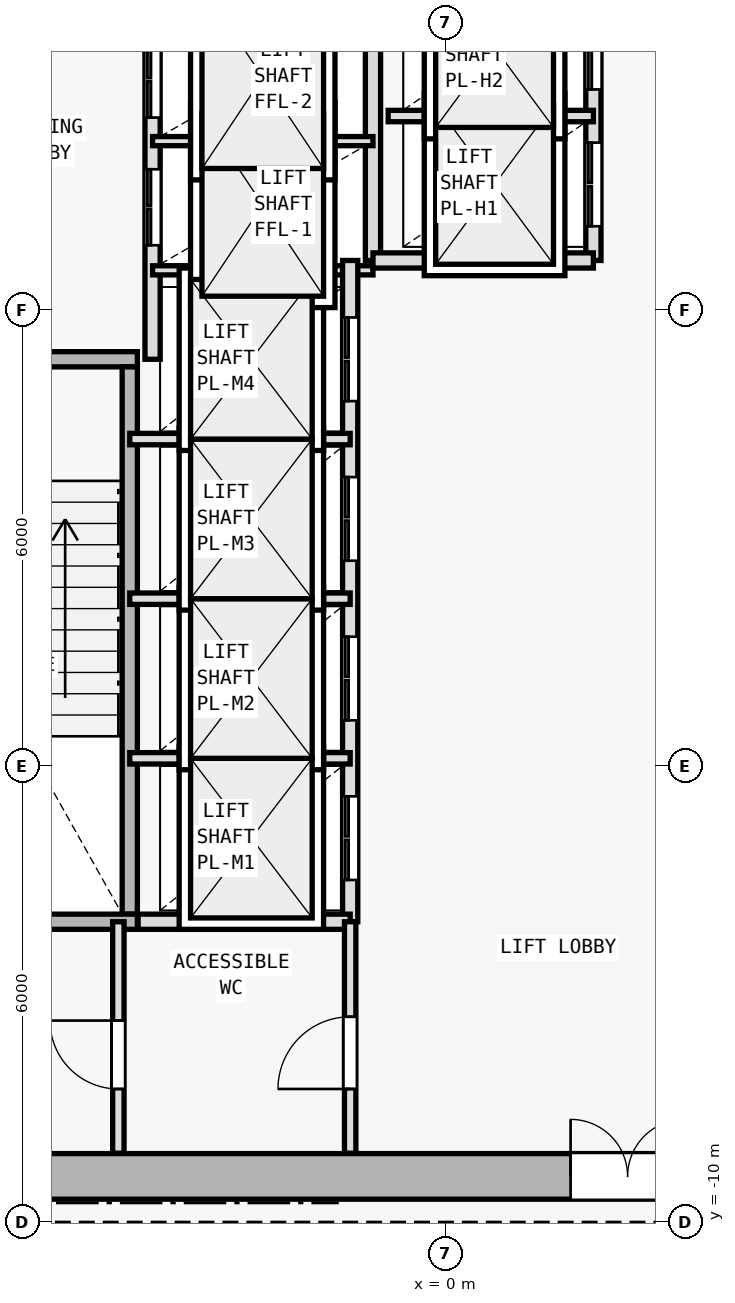
"""IFC4 building model, lengths in metres.
Left out: names, types, materials, properties, quantities, classifications, styles, units other than length and angle.
Written with IfcOpenShell. Run it as: python <this file> out.ifc"""

import sys

from ifc_helpers import new_model, si_unit, direction, frame, frame_2d, origin, origin_2d, place, context, subcontext, project, spatial, rectangle, i_section, extrude, element, fill, save


model = new_model("IFC4")
c1 = context("Model", 3, precision=1e-05, world=origin(), true_north=direction((0.0, 1.0)))
c2 = subcontext(c1, "Body", "Model", "MODEL_VIEW")
j1 = project(units=[si_unit("LENGTHUNIT", "METRE"), si_unit("PLANEANGLEUNIT", "RADIAN")], contexts=[c1])
p1 = place(None, origin())
s1 = spatial("IfcSite", under=j1, at=p1, CompositionType="ELEMENT")
p2 = place(p1, origin())
s2 = spatial("IfcBuilding", under=s1, at=p2, CompositionType="ELEMENT")
p3 = place(p2, frame((0.0, 0.0, 78.0)))
s3 = spatial("IfcBuildingStorey", under=s2, at=p3, CompositionType="ELEMENT", Elevation=78.0)
p4 = place(p3, frame((0.0, -9.4, 0.0), z_axis=(0.0, 0.0, 1.0), x_axis=(1.0, 0.0, 0.0)))
e1 = element("IfcColumn", 1, at=p4, inside=s3, PredefinedType="COLUMN", context=c2, shape_type="SweptSolid", body=[
    extrude(i_section(OverallWidth=0.416, OverallDepth=0.446, WebThickness=0.025, FlangeThickness=0.04, FilletRadius=0.015, at=origin_2d()), origin(), (0.0, 0.0, 1.0), 4.5),
])
p5 = place(p3, frame((-8.0, -9.4, 0.0), z_axis=(0.0, 0.0, 1.0), x_axis=(1.0, 0.0, 0.0)))
e2 = element("IfcWall", 2, at=p5, inside=s3, PredefinedType="SHEAR", context=c2, shape_type="SweptSolid", body=[
    extrude(rectangle(XDim=16.0, YDim=0.6, at=frame_2d((8.0, 0.0))), origin(), (0.0, 0.0, 1.0), 4.25),
])
p6 = place(p5, frame((9.65, 0.0, 0.0)))
e3 = element("IfcOpeningElement", 3, at=p6, cuts=e2, PredefinedType="OPENING", context=c2, shape_type="SweptSolid", body=[
    extrude(rectangle(XDim=1.5, YDim=2.2, at=frame_2d((0.75, 1.1))), frame((0.0, 0.31, 0.0), z_axis=(0.0, -1.0, 0.0), x_axis=(1.0, 0.0, 0.0)), (0.0, 0.0, 1.0), 0.62),
])
p7 = place(p3, frame((-7.4, 1.35, 0.0), z_axis=(0.0, 0.0, 1.0), x_axis=(1.0, 0.0, 0.0)))
e4 = element("IfcWall", 4, at=p7, inside=s3, PredefinedType="SOLIDWALL", context=c2, shape_type="SweptSolid", body=[
    extrude(rectangle(XDim=3.35, YDim=0.2, at=frame_2d((1.675, 0.0))), origin(), (0.0, 0.0, 1.0), 4.25),
])
p8 = place(p7, frame((0.65, 0.0, 0.0)))
e5 = element("IfcOpeningElement", 5, at=p8, cuts=e4, PredefinedType="OPENING", context=c2, shape_type="SweptSolid", body=[
    extrude(rectangle(XDim=1.0, YDim=2.15, at=frame_2d((0.5, 1.075))), frame((0.0, 0.11, 0.0), z_axis=(0.0, -1.0, 0.0), x_axis=(1.0, 0.0, 0.0)), (0.0, 0.0, 1.0), 0.22),
])
p9 = place(p3, frame((-4.15, -5.95, 0.0), z_axis=(0.0, 0.0, 1.0), x_axis=(0.0, 1.0, 0.0)))
e6 = element("IfcWall", 6, at=p9, inside=s3, PredefinedType="SOLIDWALL", context=c2, shape_type="SweptSolid", body=[
    extrude(rectangle(XDim=7.2, YDim=0.2, at=frame_2d((3.6, 0.0))), origin(), (0.0, 0.0, 1.0), 4.25),
])
p10 = place(p3, frame((-3.85, 1.35, 0.0), z_axis=(0.0, 0.0, 1.0), x_axis=(0.0, 1.0, 0.0)))
e7 = element("IfcWall", 7, at=p10, inside=s3, PredefinedType="SOLIDWALL", context=c2, shape_type="SweptSolid", body=[
    extrude(rectangle(XDim=8.545, YDim=0.2, at=frame_2d((4.272, 0.0))), origin(), (0.0, 0.0, 1.0), 4.25),
])
p11 = place(p10, frame((1.5, 0.0, 0.0)))
e8 = element("IfcOpeningElement", 8, at=p11, cuts=e7, PredefinedType="OPENING", context=c2, shape_type="SweptSolid", body=[
    extrude(rectangle(XDim=1.0, YDim=2.15, at=frame_2d((0.5, 1.075))), frame((0.0, 0.11, 0.0), z_axis=(0.0, -1.0, 0.0), x_axis=(1.0, 0.0, 0.0)), (0.0, 0.0, 1.0), 0.22),
])
p12 = place(p10, frame((3.18, 0.0, 0.0)))
e9 = element("IfcOpeningElement", 9, at=p12, cuts=e7, PredefinedType="OPENING", context=c2, shape_type="SweptSolid", body=[
    extrude(rectangle(XDim=1.0, YDim=2.15, at=frame_2d((0.5, 1.075))), frame((0.0, 0.11, 0.0), z_axis=(0.0, -1.0, 0.0), x_axis=(1.0, 0.0, 0.0)), (0.0, 0.0, 1.0), 0.22),
])
p13 = place(p3, frame((-0.95, 2.65, 0.0), z_axis=(0.0, 0.0, 1.0), x_axis=(0.0, 1.0, 0.0)))
e10 = element("IfcWall", 10, at=p13, inside=s3, PredefinedType="SOLIDWALL", context=c2, shape_type="SweptSolid", body=[
    extrude(rectangle(XDim=3.27, YDim=0.2, at=frame_2d((1.635, 0.0))), origin(), (0.0, 0.0, 1.0), 4.25),
])
for number, where, z_axis, x_axis in (
    (11, (-3.85, 2.52, 0.0), (0.0, 0.0, 1.0), (1.0, 0.0, 0.0)),
    (12, (-3.85, 4.22, 0.0), (0.0, 0.0, 1.0), (1.0, 0.0, 0.0)),
):
    element("IfcWall", number, at=place(p3, frame(where, z_axis=z_axis, x_axis=x_axis)), inside=s3, PredefinedType="PARTITIONING", context=c2, shape_type="SweptSolid", body=[
        extrude(rectangle(XDim=2.9, YDim=0.12, at=frame_2d((1.45, 0.0))), origin(), (0.0, 0.0, 1.0), 4.25),
    ])
p14 = place(p3, frame((-1.25, -6.05, 0.0), z_axis=(0.0, 0.0, 1.0), x_axis=(0.0, 1.0, 0.0)))
e13 = element("IfcWall", 13, at=p14, inside=s3, PredefinedType="SOLIDWALL", context=c2, shape_type="SweptSolid", body=[
    extrude(rectangle(XDim=8.7, YDim=0.2, at=frame_2d((4.35, 0.0))), origin(), (0.0, 0.0, 1.0), 4.25),
])
p15 = place(p14, frame((0.55, 0.0, 0.0)))
e14 = element("IfcOpeningElement", 14, at=p15, cuts=e13, PredefinedType="OPENING", context=c2, shape_type="SweptSolid", body=[
    extrude(rectangle(XDim=1.1, YDim=2.15, at=frame_2d((0.55, 1.075))), frame((0.0, 0.11, 0.0), z_axis=(0.0, -1.0, 0.0), x_axis=(1.0, 0.0, 0.0)), (0.0, 0.0, 1.0), 0.22),
])
p16 = place(p14, frame((2.65, 0.0, 0.0)))
e15 = element("IfcOpeningElement", 15, at=p16, cuts=e13, PredefinedType="OPENING", context=c2, shape_type="SweptSolid", body=[
    extrude(rectangle(XDim=1.1, YDim=2.15, at=frame_2d((0.55, 1.075))), frame((0.0, 0.11, 0.0), z_axis=(0.0, -1.0, 0.0), x_axis=(1.0, 0.0, 0.0)), (0.0, 0.0, 1.0), 0.22),
])
p17 = place(p14, frame((4.75, 0.0, 0.0)))
e16 = element("IfcOpeningElement", 16, at=p17, cuts=e13, PredefinedType="OPENING", context=c2, shape_type="SweptSolid", body=[
    extrude(rectangle(XDim=1.1, YDim=2.15, at=frame_2d((0.55, 1.075))), frame((0.0, 0.11, 0.0), z_axis=(0.0, -1.0, 0.0), x_axis=(1.0, 0.0, 0.0)), (0.0, 0.0, 1.0), 0.22),
])
p18 = place(p14, frame((6.85, 0.0, 0.0)))
e17 = element("IfcOpeningElement", 17, at=p18, cuts=e13, PredefinedType="OPENING", context=c2, shape_type="SweptSolid", body=[
    extrude(rectangle(XDim=1.1, YDim=2.15, at=frame_2d((0.55, 1.075))), frame((0.0, 0.11, 0.0), z_axis=(0.0, -1.0, 0.0), x_axis=(1.0, 0.0, 0.0)), (0.0, 0.0, 1.0), 0.22),
])
for number, where, z_axis, x_axis in (
    (18, (-4.15, -3.9, 0.0), (0.0, 0.0, 1.0), (1.0, 0.0, 0.0)),
    (19, (-4.15, -1.8, 0.0), (0.0, 0.0, 1.0), (1.0, 0.0, 0.0)),
    (20, (-4.15, 0.3, 0.0), (0.0, 0.0, 1.0), (1.0, 0.0, 0.0)),
):
    element("IfcWall", number, at=place(p3, frame(where, z_axis=z_axis, x_axis=x_axis)), inside=s3, PredefinedType="PARTITIONING", context=c2, shape_type="SweptSolid", body=[
        extrude(rectangle(XDim=2.9, YDim=0.15, at=frame_2d((1.45, 0.0))), origin(), (0.0, 0.0, 1.0), 4.25),
    ])
p19 = place(p3, frame((1.95, 2.65, 0.0), z_axis=(0.0, 0.0, 1.0), x_axis=(0.0, 1.0, 0.0)))
e21 = element("IfcWall", 21, at=p19, inside=s3, PredefinedType="SOLIDWALL", context=c2, shape_type="SweptSolid", body=[
    extrude(rectangle(XDim=7.245, YDim=0.2, at=frame_2d((3.623, 0.0))), origin(), (0.0, 0.0, 1.0), 4.25),
])
p20 = place(p19, frame((0.45, 0.0, 0.0)))
e22 = element("IfcOpeningElement", 22, at=p20, cuts=e21, PredefinedType="OPENING", context=c2, shape_type="SweptSolid", body=[
    extrude(rectangle(XDim=1.1, YDim=2.15, at=frame_2d((0.55, 1.075))), frame((0.0, 0.11, 0.0), z_axis=(0.0, -1.0, 0.0), x_axis=(1.0, 0.0, 0.0)), (0.0, 0.0, 1.0), 0.22),
])
p21 = place(p19, frame((2.25, 0.0, 0.0)))
e23 = element("IfcOpeningElement", 23, at=p21, cuts=e21, PredefinedType="OPENING", context=c2, shape_type="SweptSolid", body=[
    extrude(rectangle(XDim=1.1, YDim=2.15, at=frame_2d((0.55, 1.075))), frame((0.0, 0.11, 0.0), z_axis=(0.0, -1.0, 0.0), x_axis=(1.0, 0.0, 0.0)), (0.0, 0.0, 1.0), 0.22),
])
p22 = place(p19, frame((4.05, 0.0, 0.0)))
e24 = element("IfcOpeningElement", 24, at=p22, cuts=e21, PredefinedType="OPENING", context=c2, shape_type="SweptSolid", body=[
    extrude(rectangle(XDim=1.1, YDim=2.15, at=frame_2d((0.55, 1.075))), frame((0.0, 0.11, 0.0), z_axis=(0.0, -1.0, 0.0), x_axis=(1.0, 0.0, 0.0)), (0.0, 0.0, 1.0), 0.22),
])
p23 = place(p19, frame((5.85, 0.0, 0.0)))
e25 = element("IfcOpeningElement", 25, at=p23, cuts=e21, PredefinedType="OPENING", context=c2, shape_type="SweptSolid", body=[
    extrude(rectangle(XDim=1.1, YDim=2.15, at=frame_2d((0.55, 1.075))), frame((0.0, 0.11, 0.0), z_axis=(0.0, -1.0, 0.0), x_axis=(1.0, 0.0, 0.0)), (0.0, 0.0, 1.0), 0.22),
])
p24 = place(p3, frame((-0.95, 2.65, 0.0), z_axis=(0.0, 0.0, 1.0), x_axis=(1.0, 0.0, 0.0)))
e26 = element("IfcWall", 26, at=p24, inside=s3, PredefinedType="SOLIDWALL", context=c2, shape_type="SweptSolid", body=[
    extrude(rectangle(XDim=2.9, YDim=0.2, at=frame_2d((1.45, 0.0))), origin(), (0.0, 0.0, 1.0), 4.25),
])
p25 = place(p3, frame((-0.75, 4.55, 0.0), z_axis=(0.0, 0.0, 1.0), x_axis=(1.0, 0.0, 0.0)))
e27 = element("IfcWall", 27, at=p25, inside=s3, PredefinedType="PARTITIONING", context=c2, shape_type="SweptSolid", body=[
    extrude(rectangle(XDim=2.7, YDim=0.15, at=frame_2d((1.35, 0.0))), origin(), (0.0, 0.0, 1.0), 4.25),
])
p26 = place(p3, frame((-7.4, -6.05, 0.0), z_axis=(0.0, 0.0, 1.0), x_axis=(1.0, 0.0, 0.0)))
e28 = element("IfcWall", 28, at=p26, inside=s3, PredefinedType="SOLIDWALL", context=c2, shape_type="SweptSolid", body=[
    extrude(rectangle(XDim=3.35, YDim=0.2, at=frame_2d((1.675, 0.0))), origin(), (0.0, 0.0, 1.0), 4.25),
])
p27 = place(p3, frame((-4.04, -6.05, 0.0), z_axis=(0.0, 0.0, 1.0), x_axis=(1.0, 0.0, 0.0)))
e29 = element("IfcWall", 29, at=p27, inside=s3, PredefinedType="SOLIDWALL", context=c2, shape_type="SweptSolid", body=[
    extrude(rectangle(XDim=2.79, YDim=0.2, at=frame_2d((1.395, 0.0))), origin(), (0.0, 0.0, 1.0), 4.25),
])
p28 = place(p3, frame((-1.25, -9.095, 0.0), z_axis=(0.0, 0.0, 1.0), x_axis=(0.0, 1.0, 0.0)))
e30 = element("IfcWall", 30, at=p28, inside=s3, PredefinedType="PARTITIONING", context=c2, shape_type="SweptSolid", body=[
    extrude(rectangle(XDim=3.045, YDim=0.15, at=frame_2d((1.522, 0.0))), origin(), (0.0, 0.0, 1.0), 4.25),
])
p29 = place(p28, frame((0.845, 0.0, 0.0)))
e31 = element("IfcOpeningElement", 31, at=p29, cuts=e30, PredefinedType="OPENING", context=c2, shape_type="SweptSolid", body=[
    extrude(rectangle(XDim=0.95, YDim=2.1, at=frame_2d((0.475, 1.05))), frame((0.0, 0.085, 0.0), z_axis=(0.0, -1.0, 0.0), x_axis=(1.0, 0.0, 0.0)), (0.0, 0.0, 1.0), 0.17),
])
p30 = place(p3, frame((-4.3, -9.095, 0.0), z_axis=(0.0, 0.0, 1.0), x_axis=(0.0, 1.0, 0.0)))
e32 = element("IfcWall", 32, at=p30, inside=s3, PredefinedType="PARTITIONING", context=c2, shape_type="SweptSolid", body=[
    extrude(rectangle(XDim=3.045, YDim=0.15, at=frame_2d((1.522, 0.0))), origin(), (0.0, 0.0, 1.0), 4.25),
])
p31 = place(p30, frame((0.845, 0.0, 0.0)))
e33 = element("IfcOpeningElement", 33, at=p31, cuts=e32, PredefinedType="OPENING", context=c2, shape_type="SweptSolid", body=[
    extrude(rectangle(XDim=0.9, YDim=2.1, at=frame_2d((0.45, 1.05))), frame((0.0, 0.085, 0.0), z_axis=(0.0, -1.0, 0.0), x_axis=(1.0, 0.0, 0.0)), (0.0, 0.0, 1.0), 0.17),
])
p32 = place(p6, origin())
e34 = element("IfcDoor", 34, at=p32, inside=s3, OperationType="DOUBLE_DOOR_SINGLE_SWING", PredefinedType="DOOR", context=c2, shape_type="SweptSolid", body=[
    extrude(rectangle(XDim=1.5, YDim=2.2, at=frame_2d((0.75, 1.1))), frame((0.0, 0.025, 0.0), z_axis=(0.0, -1.0, 0.0), x_axis=(1.0, 0.0, 0.0)), (0.0, 0.0, 1.0), 0.05),
])
fill(e3, e34)
p33 = place(p15, origin())
e35 = element("IfcDoor", 35, at=p33, inside=s3, OperationType="DOUBLE_DOOR_SLIDING", PredefinedType="DOOR", context=c2, shape_type="SweptSolid", body=[
    extrude(rectangle(XDim=1.1, YDim=2.15, at=frame_2d((0.55, 1.075))), frame((0.0, 0.025, 0.0), z_axis=(0.0, -1.0, 0.0), x_axis=(1.0, 0.0, 0.0)), (0.0, 0.0, 1.0), 0.05),
])
fill(e14, e35)
p34 = place(p16, origin())
e36 = element("IfcDoor", 36, at=p34, inside=s3, OperationType="DOUBLE_DOOR_SLIDING", PredefinedType="DOOR", context=c2, shape_type="SweptSolid", body=[
    extrude(rectangle(XDim=1.1, YDim=2.15, at=frame_2d((0.55, 1.075))), frame((0.0, 0.025, 0.0), z_axis=(0.0, -1.0, 0.0), x_axis=(1.0, 0.0, 0.0)), (0.0, 0.0, 1.0), 0.05),
])
fill(e15, e36)
p35 = place(p17, origin())
e37 = element("IfcDoor", 37, at=p35, inside=s3, OperationType="DOUBLE_DOOR_SLIDING", PredefinedType="DOOR", context=c2, shape_type="SweptSolid", body=[
    extrude(rectangle(XDim=1.1, YDim=2.15, at=frame_2d((0.55, 1.075))), frame((0.0, 0.025, 0.0), z_axis=(0.0, -1.0, 0.0), x_axis=(1.0, 0.0, 0.0)), (0.0, 0.0, 1.0), 0.05),
])
fill(e16, e37)
p36 = place(p18, origin())
e38 = element("IfcDoor", 38, at=p36, inside=s3, OperationType="DOUBLE_DOOR_SLIDING", PredefinedType="DOOR", context=c2, shape_type="SweptSolid", body=[
    extrude(rectangle(XDim=1.1, YDim=2.15, at=frame_2d((0.55, 1.075))), frame((0.0, 0.025, 0.0), z_axis=(0.0, -1.0, 0.0), x_axis=(1.0, 0.0, 0.0)), (0.0, 0.0, 1.0), 0.05),
])
fill(e17, e38)
p37 = place(p20, origin())
e39 = element("IfcDoor", 39, at=p37, inside=s3, OperationType="DOUBLE_DOOR_SLIDING", PredefinedType="DOOR", context=c2, shape_type="SweptSolid", body=[
    extrude(rectangle(XDim=1.1, YDim=2.15, at=frame_2d((0.55, 1.075))), frame((0.0, 0.025, 0.0), z_axis=(0.0, -1.0, 0.0), x_axis=(1.0, 0.0, 0.0)), (0.0, 0.0, 1.0), 0.05),
])
fill(e22, e39)
p38 = place(p21, origin())
e40 = element("IfcDoor", 40, at=p38, inside=s3, OperationType="DOUBLE_DOOR_SLIDING", PredefinedType="DOOR", context=c2, shape_type="SweptSolid", body=[
    extrude(rectangle(XDim=1.1, YDim=2.15, at=frame_2d((0.55, 1.075))), frame((0.0, 0.025, 0.0), z_axis=(0.0, -1.0, 0.0), x_axis=(1.0, 0.0, 0.0)), (0.0, 0.0, 1.0), 0.05),
])
fill(e23, e40)
p39 = place(p11, origin())
e41 = element("IfcDoor", 41, at=p39, inside=s3, OperationType="DOUBLE_DOOR_SLIDING", PredefinedType="DOOR", context=c2, shape_type="SweptSolid", body=[
    extrude(rectangle(XDim=1.0, YDim=2.15, at=frame_2d((0.5, 1.075))), frame((0.0, 0.025, 0.0), z_axis=(0.0, -1.0, 0.0), x_axis=(1.0, 0.0, 0.0)), (0.0, 0.0, 1.0), 0.05),
])
fill(e8, e41)
p40 = place(p12, origin())
e42 = element("IfcDoor", 42, at=p40, inside=s3, OperationType="DOUBLE_DOOR_SLIDING", PredefinedType="DOOR", context=c2, shape_type="SweptSolid", body=[
    extrude(rectangle(XDim=1.0, YDim=2.15, at=frame_2d((0.5, 1.075))), frame((0.0, 0.025, 0.0), z_axis=(0.0, -1.0, 0.0), x_axis=(1.0, 0.0, 0.0)), (0.0, 0.0, 1.0), 0.05),
])
fill(e9, e42)
p41 = place(p29, origin())
e43 = element("IfcDoor", 43, at=p41, inside=s3, OperationType="SINGLE_SWING_LEFT", PredefinedType="DOOR", context=c2, shape_type="SweptSolid", body=[
    extrude(rectangle(XDim=0.95, YDim=2.1, at=frame_2d((0.475, 1.05))), frame((0.0, 0.025, 0.0), z_axis=(0.0, -1.0, 0.0), x_axis=(1.0, 0.0, 0.0)), (0.0, 0.0, 1.0), 0.05),
])
fill(e31, e43)
p42 = place(p31, origin())
e44 = element("IfcDoor", 44, at=p42, inside=s3, OperationType="SINGLE_SWING_RIGHT", PredefinedType="DOOR", context=c2, shape_type="SweptSolid", body=[
    extrude(rectangle(XDim=0.9, YDim=2.1, at=frame_2d((0.45, 1.05))), frame((0.0, 0.025, 0.0), z_axis=(0.0, -1.0, 0.0), x_axis=(1.0, 0.0, 0.0)), (0.0, 0.0, 1.0), 0.05),
])
fill(e33, e44)
save(model, sys.argv[1])
